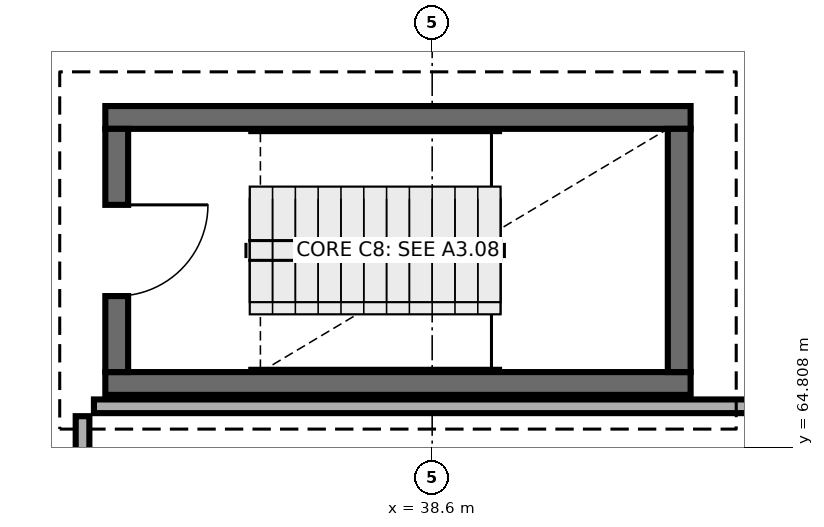
"""IFC4 building model, lengths in metres.
Left out: names, types, materials, properties, quantities, classifications, styles, units other than length and angle.
Written with IfcOpenShell. Run it as: python <this file> out.ifc"""

import sys

from ifc_helpers import new_model, si_unit, direction, frame, frame_2d, origin, place, context, subcontext, project, spatial, rectangle, extrude, element, fill, save


model = new_model("IFC4")
c1 = context("Model", 3, precision=1e-05, world=origin(), true_north=direction((0.0, 1.0)))
c2 = subcontext(c1, "Body", "Model", "MODEL_VIEW")
j1 = project(units=[si_unit("LENGTHUNIT", "METRE"), si_unit("PLANEANGLEUNIT", "RADIAN")], contexts=[c1])
p1 = place(None, origin())
s1 = spatial("IfcSite", under=j1, at=p1, CompositionType="ELEMENT")
p2 = place(p1, origin())
s2 = spatial("IfcBuilding", under=s1, at=p2, CompositionType="ELEMENT")
p3 = place(p2, frame((0.0, 0.0, 9.3)))
s3 = spatial("IfcBuildingStorey", under=s2, at=p3, CompositionType="ELEMENT", Elevation=9.3)
for number, where, z_axis, x_axis in (
    (1, (34.3, 65.65, 0.0), (0.0, 0.0, 1.0), (1.0, 0.0, 0.0)),
    (2, (42.0, 69.15, 0.0), (0.0, 0.0, 1.0), (-1.0, 0.0, 0.0)),
):
    element("IfcWall", number, at=place(p3, frame(where, z_axis=z_axis, x_axis=x_axis)), inside=s3, PredefinedType="SHEAR", context=c2, shape_type="SweptSolid", body=[
        extrude(rectangle(XDim=7.7, YDim=0.3, at=frame_2d((3.85, 0.0))), origin(), (0.0, 0.0, 1.0), 4.5),
    ])
p4 = place(p3, frame((34.45, 69.0, 0.0), z_axis=(0.0, 0.0, 1.0), x_axis=(0.0, -1.0, 0.0)))
e3 = element("IfcWall", 3, at=p4, inside=s3, PredefinedType="SHEAR", context=c2, shape_type="SweptSolid", body=[
    extrude(rectangle(XDim=3.2, YDim=0.3, at=frame_2d((1.6, 0.0))), origin(), (0.0, 0.0, 1.0), 4.5),
])
p5 = place(p4, frame((1.0, 0.0, 0.0)))
e4 = element("IfcOpeningElement", 4, at=p5, cuts=e3, PredefinedType="OPENING", context=c2, shape_type="SweptSolid", body=[
    extrude(rectangle(XDim=1.2, YDim=2.15, at=frame_2d((0.6, 1.075))), frame((0.0, 0.16, 0.0), z_axis=(0.0, -1.0, 0.0), x_axis=(1.0, 0.0, 0.0)), (0.0, 0.0, 1.0), 0.32),
])
p6 = place(p3, frame((41.85, 65.8, 0.0), z_axis=(0.0, 0.0, 1.0), x_axis=(0.0, 1.0, 0.0)))
e5 = element("IfcWall", 5, at=p6, inside=s3, PredefinedType="SHEAR", context=c2, shape_type="SweptSolid", body=[
    extrude(rectangle(XDim=3.2, YDim=0.3, at=frame_2d((1.6, 0.0))), origin(), (0.0, 0.0, 1.0), 4.5),
])
p7 = place(p3, frame((34.15, 65.35, 0.0), z_axis=(0.0, 0.0, 1.0), x_axis=(1.0, 0.0, 0.0)))
e6 = element("IfcWall", 6, at=p7, inside=s3, PredefinedType="PARTITIONING", context=c2, shape_type="SweptSolid", body=[
    extrude(rectangle(XDim=12.965, YDim=0.18, at=frame_2d((6.482, 0.0))), origin(), (0.0, 0.0, 1.0), 4.25),
])
p8 = place(p3, frame((34.0, 61.75, 0.0), z_axis=(0.0, 0.0, 1.0), x_axis=(0.0, 1.0, 0.0)))
e7 = element("IfcWall", 7, at=p8, inside=s3, PredefinedType="PARTITIONING", context=c2, shape_type="SweptSolid", body=[
    extrude(rectangle(XDim=3.47, YDim=0.18, at=frame_2d((1.735, 0.0))), origin(), (0.0, 0.0, 1.0), 4.25),
])
p9 = place(p8, frame((1.285, 0.0, 0.0)))
e8 = element("IfcOpeningElement", 8, at=p9, cuts=e7, PredefinedType="OPENING", context=c2, shape_type="SweptSolid", body=[
    extrude(rectangle(XDim=0.9, YDim=2.1, at=frame_2d((0.45, 1.05))), frame((0.0, 0.1, 0.0), z_axis=(0.0, -1.0, 0.0), x_axis=(1.0, 0.0, 0.0)), (0.0, 0.0, 1.0), 0.2),
])
p10 = place(p5, origin())
e9 = element("IfcDoor", 9, at=p10, inside=s3, OperationType="SINGLE_SWING_LEFT", PredefinedType="DOOR", context=c2, shape_type="SweptSolid", body=[
    extrude(rectangle(XDim=1.2, YDim=2.15, at=frame_2d((0.6, 1.075))), frame((0.0, 0.025, 0.0), z_axis=(0.0, -1.0, 0.0), x_axis=(1.0, 0.0, 0.0)), (0.0, 0.0, 1.0), 0.05),
])
fill(e4, e9)
save(model, sys.argv[1])
